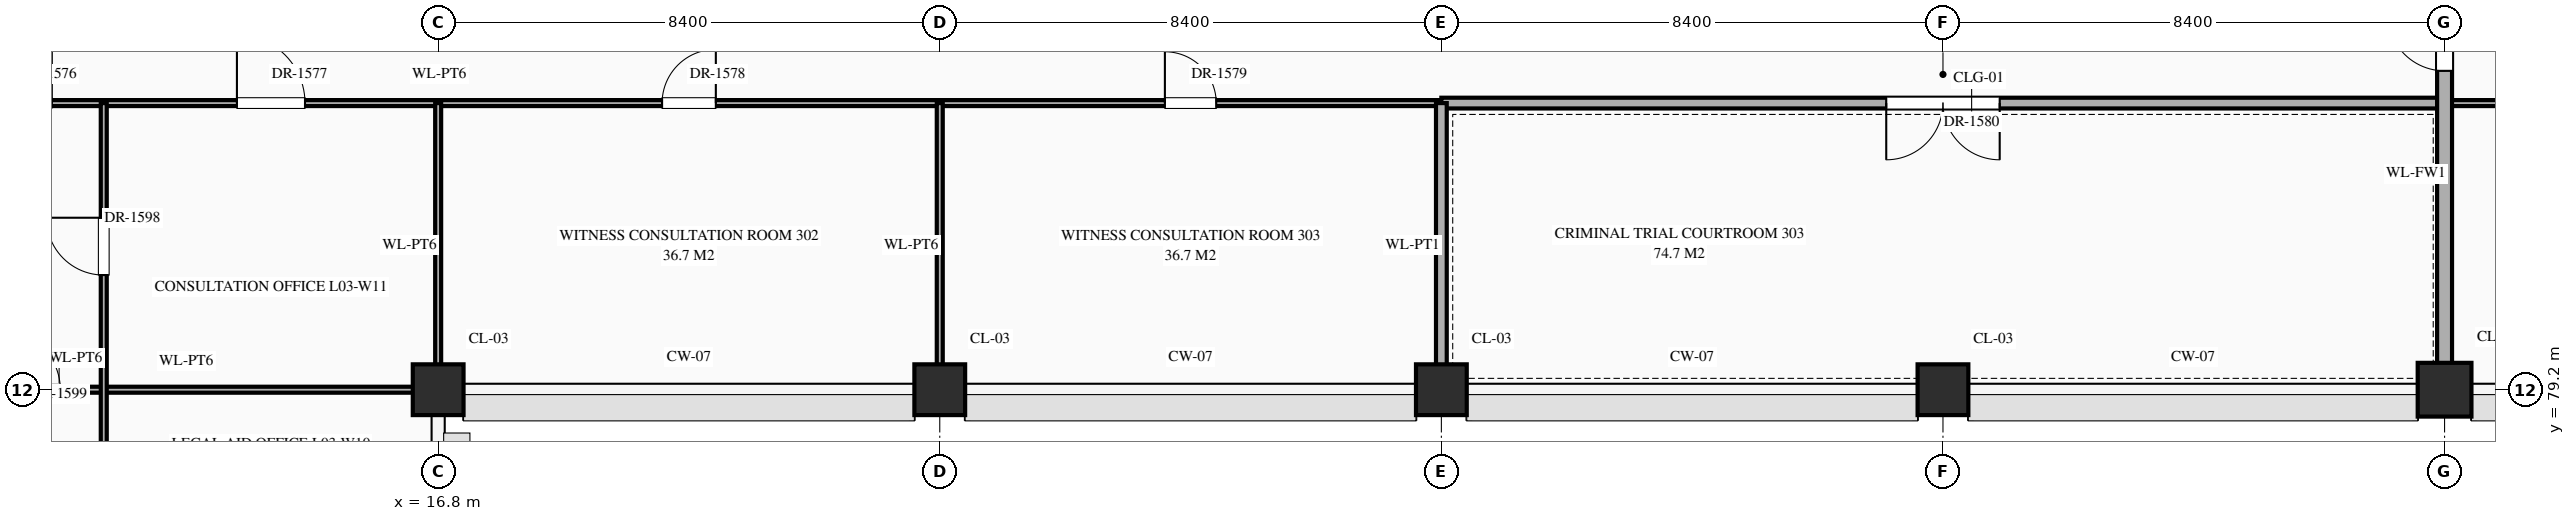
"""IFC4 building model, lengths in metres.
Left out: names, types, materials, properties, quantities, classifications, styles, units other than length and angle.
Written with IfcOpenShell. Run it as: python <this file> out.ifc"""

import sys

from ifc_helpers import new_model, si_unit, direction, frame, frame_2d, origin, origin_2d, place, context, subcontext, project, spatial, rectangle, extrude, element, fill, save


model = new_model("IFC4")
c1 = context("Model", 3, precision=1e-05, world=origin(), true_north=direction((0.0, 1.0)))
c2 = subcontext(c1, "Body", "Model", "MODEL_VIEW")
j1 = project(units=[si_unit("LENGTHUNIT", "METRE"), si_unit("PLANEANGLEUNIT", "RADIAN")], contexts=[c1])
p1 = place(None, origin())
s1 = spatial("IfcSite", under=j1, at=p1, CompositionType="ELEMENT")
p2 = place(p1, origin())
s2 = spatial("IfcBuilding", under=s1, at=p2, CompositionType="ELEMENT")
p3 = place(p2, frame((0.0, 0.0, 10.8)))
s3 = spatial("IfcBuildingStorey", under=s2, at=p3, CompositionType="ELEMENT", Elevation=10.8)
for number, where, z_axis, x_axis in (
    (1, (16.8, 79.2, 0.0), (0.0, 0.0, 1.0), (1.0, 0.0, 0.0)),
    (2, (25.2, 79.2, 0.0), (0.0, 0.0, 1.0), (1.0, 0.0, 0.0)),
    (3, (33.6, 79.2, 0.0), (0.0, 0.0, 1.0), (1.0, 0.0, 0.0)),
    (4, (42.0, 79.2, 0.0), (0.0, 0.0, 1.0), (1.0, 0.0, 0.0)),
):
    element("IfcColumn", number, at=place(p3, frame(where, z_axis=z_axis, x_axis=x_axis)), inside=s3, PredefinedType="COLUMN", context=c2, shape_type="SweptSolid", body=[
        extrude(rectangle(XDim=0.85, YDim=0.85, at=origin_2d()), origin(), (0.0, 0.0, 1.0), 5.4),
    ])
p4 = place(p3, frame((50.4, 79.2, 0.0), z_axis=(0.0, 0.0, 1.0), x_axis=(1.0, 0.0, 0.0)))
e5 = element("IfcColumn", 5, at=p4, inside=s3, PredefinedType="COLUMN", context=c2, shape_type="SweptSolid", body=[
    extrude(rectangle(XDim=0.9, YDim=0.9, at=origin_2d()), origin(), (0.0, 0.0, 1.0), 5.4),
])
p5 = place(p3, frame((8.4, 79.2, 0.0), z_axis=(0.0, 0.0, 1.0), x_axis=(1.0, 0.0, 0.0)))
e6 = element("IfcWall", 6, at=p5, inside=s3, PredefinedType="STANDARD", context=c2, shape_type="SweptSolid", body=[
    extrude(rectangle(XDim=8.36, YDim=0.1, at=frame_2d((4.18, 0.0))), origin(), (0.0, 0.0, 1.0), 4.27),
])
p6 = place(p5, frame((1.073, 0.0, 0.0)))
e7 = element("IfcOpeningElement", 7, at=p6, cuts=e6, PredefinedType="OPENING", context=c2, shape_type="SweptSolid", body=[
    extrude(rectangle(XDim=1.0, YDim=2.25, at=frame_2d((0.5, 1.125))), frame((0.0, 0.062, 0.0), z_axis=(0.0, -1.0, 0.0), x_axis=(1.0, 0.0, 0.0)), (0.0, 0.0, 1.0), 0.124),
])
p7 = place(p3, frame((0.04, 84.0, 0.0), z_axis=(0.0, 0.0, 1.0), x_axis=(1.0, 0.0, 0.0)))
e8 = element("IfcWall", 8, at=p7, inside=s3, PredefinedType="STANDARD", context=c2, shape_type="SweptSolid", body=[
    extrude(rectangle(XDim=33.56, YDim=0.1, at=frame_2d((16.78, 0.0))), origin(), (0.0, 0.0, 1.0), 5.12),
])
p8 = place(p7, frame((3.67, 0.0, 0.0)))
e9 = element("IfcOpeningElement", 9, at=p8, cuts=e8, PredefinedType="OPENING", context=c2, shape_type="SweptSolid", body=[
    extrude(rectangle(XDim=1.02, YDim=2.4, at=frame_2d((0.51, 1.2))), frame((0.0, 0.062, 0.0), z_axis=(0.0, -1.0, 0.0), x_axis=(1.0, 0.0, 0.0)), (0.0, 0.0, 1.0), 0.124),
])
p9 = place(p7, frame((9.23, 0.0, 0.0)))
e10 = element("IfcOpeningElement", 10, at=p9, cuts=e8, PredefinedType="OPENING", context=c2, shape_type="SweptSolid", body=[
    extrude(rectangle(XDim=1.06, YDim=2.4, at=frame_2d((0.53, 1.2))), frame((0.0, 0.062, 0.0), z_axis=(0.0, -1.0, 0.0), x_axis=(1.0, 0.0, 0.0)), (0.0, 0.0, 1.0), 0.124),
])
p10 = place(p7, frame((13.39, 0.0, 0.0)))
e11 = element("IfcOpeningElement", 11, at=p10, cuts=e8, PredefinedType="OPENING", context=c2, shape_type="SweptSolid", body=[
    extrude(rectangle(XDim=1.14, YDim=2.4, at=frame_2d((0.57, 1.2))), frame((0.0, 0.062, 0.0), z_axis=(0.0, -1.0, 0.0), x_axis=(1.0, 0.0, 0.0)), (0.0, 0.0, 1.0), 0.124),
])
p11 = place(p7, frame((20.51, 0.0, 0.0)))
e12 = element("IfcOpeningElement", 12, at=p11, cuts=e8, PredefinedType="OPENING", context=c2, shape_type="SweptSolid", body=[
    extrude(rectangle(XDim=0.9, YDim=2.15, at=frame_2d((0.45, 1.075))), frame((0.0, 0.062, 0.0), z_axis=(0.0, -1.0, 0.0), x_axis=(1.0, 0.0, 0.0)), (0.0, 0.0, 1.0), 0.124),
])
p12 = place(p7, frame((28.93, 0.0, 0.0)))
e13 = element("IfcOpeningElement", 13, at=p12, cuts=e8, PredefinedType="OPENING", context=c2, shape_type="SweptSolid", body=[
    extrude(rectangle(XDim=0.86, YDim=2.1, at=frame_2d((0.43, 1.05))), frame((0.0, 0.062, 0.0), z_axis=(0.0, -1.0, 0.0), x_axis=(1.0, 0.0, 0.0)), (0.0, 0.0, 1.0), 0.124),
])
p13 = place(p3, frame((33.6, 84.0, 0.0), z_axis=(0.0, 0.0, 1.0), x_axis=(1.0, 0.0, 0.0)))
e14 = element("IfcWall", 14, at=p13, inside=s3, PredefinedType="STANDARD", context=c2, shape_type="SweptSolid", body=[
    extrude(rectangle(XDim=16.8, YDim=0.18, at=frame_2d((8.4, 0.0))), origin(), (0.0, 0.0, 1.0), 5.12),
])
p14 = place(p13, frame((7.45, 0.0, 0.0)))
e15 = element("IfcOpeningElement", 15, at=p14, cuts=e14, PredefinedType="OPENING", context=c2, shape_type="SweptSolid", body=[
    extrude(rectangle(XDim=1.9, YDim=2.5, at=frame_2d((0.95, 1.25))), frame((0.0, 0.102, 0.0), z_axis=(0.0, -1.0, 0.0), x_axis=(1.0, 0.0, 0.0)), (0.0, 0.0, 1.0), 0.204),
])
p15 = place(p3, frame((50.4, 84.0, 0.0), z_axis=(0.0, 0.0, 1.0), x_axis=(1.0, 0.0, 0.0)))
e16 = element("IfcWall", 16, at=p15, inside=s3, PredefinedType="STANDARD", context=c2, shape_type="SweptSolid", body=[
    extrude(rectangle(XDim=67.2, YDim=0.1, at=frame_2d((33.6, 0.0))), origin(), (0.0, 0.0, 1.0), 5.12),
])
p16 = place(p15, frame((3.7, 0.0, 0.0)))
e17 = element("IfcOpeningElement", 17, at=p16, cuts=e16, PredefinedType="OPENING", context=c2, shape_type="SweptSolid", body=[
    extrude(rectangle(XDim=1.0, YDim=2.25, at=frame_2d((0.5, 1.125))), frame((0.0, 0.062, 0.0), z_axis=(0.0, -1.0, 0.0), x_axis=(1.0, 0.0, 0.0)), (0.0, 0.0, 1.0), 0.124),
])
p17 = place(p15, frame((12.08, 0.0, 0.0)))
e18 = element("IfcOpeningElement", 18, at=p17, cuts=e16, PredefinedType="OPENING", context=c2, shape_type="SweptSolid", body=[
    extrude(rectangle(XDim=1.04, YDim=2.2, at=frame_2d((0.52, 1.1))), frame((0.0, 0.062, 0.0), z_axis=(0.0, -1.0, 0.0), x_axis=(1.0, 0.0, 0.0)), (0.0, 0.0, 1.0), 0.124),
])
p18 = place(p15, frame((20.46, 0.0, 0.0)))
e19 = element("IfcOpeningElement", 19, at=p18, cuts=e16, PredefinedType="OPENING", context=c2, shape_type="SweptSolid", body=[
    extrude(rectangle(XDim=1.08, YDim=2.25, at=frame_2d((0.54, 1.125))), frame((0.0, 0.062, 0.0), z_axis=(0.0, -1.0, 0.0), x_axis=(1.0, 0.0, 0.0)), (0.0, 0.0, 1.0), 0.124),
])
p19 = place(p15, frame((28.84, 0.0, 0.0)))
e20 = element("IfcOpeningElement", 20, at=p19, cuts=e16, PredefinedType="OPENING", context=c2, shape_type="SweptSolid", body=[
    extrude(rectangle(XDim=1.12, YDim=2.25, at=frame_2d((0.56, 1.125))), frame((0.0, 0.062, 0.0), z_axis=(0.0, -1.0, 0.0), x_axis=(1.0, 0.0, 0.0)), (0.0, 0.0, 1.0), 0.124),
])
p20 = place(p15, frame((37.2, 0.0, 0.0)))
e21 = element("IfcOpeningElement", 21, at=p20, cuts=e16, PredefinedType="OPENING", context=c2, shape_type="SweptSolid", body=[
    extrude(rectangle(XDim=1.2, YDim=2.35, at=frame_2d((0.6, 1.175))), frame((0.0, 0.062, 0.0), z_axis=(0.0, -1.0, 0.0), x_axis=(1.0, 0.0, 0.0)), (0.0, 0.0, 1.0), 0.124),
])
p21 = place(p15, frame((45.58, 0.0, 0.0)))
e22 = element("IfcOpeningElement", 22, at=p21, cuts=e16, PredefinedType="OPENING", context=c2, shape_type="SweptSolid", body=[
    extrude(rectangle(XDim=1.24, YDim=2.3, at=frame_2d((0.62, 1.15))), frame((0.0, 0.062, 0.0), z_axis=(0.0, -1.0, 0.0), x_axis=(1.0, 0.0, 0.0)), (0.0, 0.0, 1.0), 0.124),
])
p22 = place(p15, frame((53.96, 0.0, 0.0)))
e23 = element("IfcOpeningElement", 23, at=p22, cuts=e16, PredefinedType="OPENING", context=c2, shape_type="SweptSolid", body=[
    extrude(rectangle(XDim=1.28, YDim=2.35, at=frame_2d((0.64, 1.175))), frame((0.0, 0.062, 0.0), z_axis=(0.0, -1.0, 0.0), x_axis=(1.0, 0.0, 0.0)), (0.0, 0.0, 1.0), 0.124),
])
p23 = place(p15, frame((62.53, 0.0, 0.0)))
e24 = element("IfcOpeningElement", 24, at=p23, cuts=e16, PredefinedType="OPENING", context=c2, shape_type="SweptSolid", body=[
    extrude(rectangle(XDim=0.94, YDim=2.3, at=frame_2d((0.47, 1.15))), frame((0.0, 0.062, 0.0), z_axis=(0.0, -1.0, 0.0), x_axis=(1.0, 0.0, 0.0)), (0.0, 0.0, 1.0), 0.124),
])
p24 = place(p3, frame((11.2, 64.8, 0.0), z_axis=(0.0, 0.0, 1.0), x_axis=(0.0, 1.0, 0.0)))
e25 = element("IfcWall", 25, at=p24, inside=s3, PredefinedType="STANDARD", context=c2, shape_type="SweptSolid", body=[
    extrude(rectangle(XDim=19.2, YDim=0.1, at=frame_2d((9.6, 0.0))), origin(), (0.0, 0.0, 1.0), 5.12),
])
p25 = place(p24, frame((16.32, 0.0, 0.0)))
e26 = element("IfcOpeningElement", 26, at=p25, cuts=e25, PredefinedType="OPENING", context=c2, shape_type="SweptSolid", body=[
    extrude(rectangle(XDim=0.96, YDim=2.2, at=frame_2d((0.48, 1.1))), frame((0.0, 0.062, 0.0), z_axis=(0.0, -1.0, 0.0), x_axis=(1.0, 0.0, 0.0)), (0.0, 0.0, 1.0), 0.124),
])
p26 = place(p24, frame((0.73, 0.0, 0.0)))
e27 = element("IfcOpeningElement", 27, at=p26, cuts=e25, PredefinedType="OPENING", context=c2, shape_type="SweptSolid", body=[
    extrude(rectangle(XDim=0.94, YDim=2.3, at=frame_2d((0.47, 1.15))), frame((0.0, 0.062, 0.0), z_axis=(0.0, -1.0, 0.0), x_axis=(1.0, 0.0, 0.0)), (0.0, 0.0, 1.0), 0.124),
])
p27 = place(p24, frame((4.31, 0.0, 0.0)))
e28 = element("IfcOpeningElement", 28, at=p27, cuts=e25, PredefinedType="OPENING", context=c2, shape_type="SweptSolid", body=[
    extrude(rectangle(XDim=0.98, YDim=2.35, at=frame_2d((0.49, 1.175))), frame((0.0, 0.062, 0.0), z_axis=(0.0, -1.0, 0.0), x_axis=(1.0, 0.0, 0.0)), (0.0, 0.0, 1.0), 0.124),
])
p28 = place(p24, frame((10.29, 0.0, 0.0)))
e29 = element("IfcOpeningElement", 29, at=p28, cuts=e25, PredefinedType="OPENING", context=c2, shape_type="SweptSolid", body=[
    extrude(rectangle(XDim=1.02, YDim=2.4, at=frame_2d((0.51, 1.2))), frame((0.0, 0.062, 0.0), z_axis=(0.0, -1.0, 0.0), x_axis=(1.0, 0.0, 0.0)), (0.0, 0.0, 1.0), 0.124),
])
for number, where, z_axis, x_axis in (
    (30, (16.8, 79.24, 0.0), (0.0, 0.0, 1.0), (0.0, 1.0, 0.0)),
    (31, (25.2, 79.24, 0.0), (0.0, 0.0, 1.0), (0.0, 1.0, 0.0)),
):
    element("IfcWall", number, at=place(p3, frame(where, z_axis=z_axis, x_axis=x_axis)), inside=s3, PredefinedType="STANDARD", context=c2, shape_type="SweptSolid", body=[
        extrude(rectangle(XDim=4.76, YDim=0.1, at=frame_2d((2.38, 0.0))), origin(), (0.0, 0.0, 1.0), 4.37),
    ])
p29 = place(p3, frame((33.6, 79.24, 0.0), z_axis=(0.0, 0.0, 1.0), x_axis=(0.0, 1.0, 0.0)))
e32 = element("IfcWall", 32, at=p29, inside=s3, PredefinedType="STANDARD", context=c2, shape_type="SweptSolid", body=[
    extrude(rectangle(XDim=4.76, YDim=0.18, at=frame_2d((2.38, 0.0))), origin(), (0.0, 0.0, 1.0), 4.37),
])
p30 = place(p3, frame((50.4, 79.24, 0.0), z_axis=(0.0, 0.0, 1.0), x_axis=(0.0, 1.0, 0.0)))
e33 = element("IfcWall", 33, at=p30, inside=s3, PredefinedType="STANDARD", context=c2, shape_type="SweptSolid", body=[
    extrude(rectangle(XDim=7.16, YDim=0.25, at=frame_2d((3.58, 0.0))), origin(), (0.0, 0.0, 1.0), 4.37),
])
p31 = place(p30, frame((5.3, 0.0, 0.0)))
e34 = element("IfcOpeningElement", 34, at=p31, cuts=e33, PredefinedType="OPENING", context=c2, shape_type="SweptSolid", body=[
    extrude(rectangle(XDim=0.95, YDim=2.15, at=frame_2d((0.475, 1.075))), frame((0.0, 0.137, 0.0), z_axis=(0.0, -1.0, 0.0), x_axis=(1.0, 0.0, 0.0)), (0.0, 0.0, 1.0), 0.274),
])
p32 = place(p31, origin())
e35 = element("IfcDoor", 35, at=p32, inside=s3, OperationType="SINGLE_SWING_RIGHT", PredefinedType="DOOR", context=c2, shape_type="SweptSolid", body=[
    extrude(rectangle(XDim=0.95, YDim=2.15, at=frame_2d((0.475, 1.075))), frame((0.0, 0.025, 0.0), z_axis=(0.0, -1.0, 0.0), x_axis=(1.0, 0.0, 0.0)), (0.0, 0.0, 1.0), 0.05),
])
fill(e34, e35)
p33 = place(p10, origin())
e36 = element("IfcDoor", 36, at=p33, inside=s3, OperationType="SINGLE_SWING_LEFT", PredefinedType="DOOR", context=c2, shape_type="SweptSolid", body=[
    extrude(rectangle(XDim=1.14, YDim=2.4, at=frame_2d((0.57, 1.2))), frame((0.0, 0.025, 0.0), z_axis=(0.0, -1.0, 0.0), x_axis=(1.0, 0.0, 0.0)), (0.0, 0.0, 1.0), 0.05),
])
fill(e11, e36)
p34 = place(p11, origin())
e37 = element("IfcDoor", 37, at=p34, inside=s3, OperationType="SINGLE_SWING_RIGHT", PredefinedType="DOOR", context=c2, shape_type="SweptSolid", body=[
    extrude(rectangle(XDim=0.9, YDim=2.15, at=frame_2d((0.45, 1.075))), frame((0.0, 0.025, 0.0), z_axis=(0.0, -1.0, 0.0), x_axis=(1.0, 0.0, 0.0)), (0.0, 0.0, 1.0), 0.05),
])
fill(e12, e37)
p35 = place(p12, origin())
e38 = element("IfcDoor", 38, at=p35, inside=s3, OperationType="SINGLE_SWING_LEFT", PredefinedType="DOOR", context=c2, shape_type="SweptSolid", body=[
    extrude(rectangle(XDim=0.86, YDim=2.1, at=frame_2d((0.43, 1.05))), frame((0.0, 0.025, 0.0), z_axis=(0.0, -1.0, 0.0), x_axis=(1.0, 0.0, 0.0)), (0.0, 0.0, 1.0), 0.05),
])
fill(e13, e38)
p36 = place(p14, frame((1.9, 0.0, 0.0), z_axis=(0.0, 0.0, 1.0), x_axis=(-1.0, 0.0, 0.0)))
e39 = element("IfcDoor", 39, at=p36, inside=s3, OperationType="DOUBLE_DOOR_SINGLE_SWING", PredefinedType="DOOR", context=c2, shape_type="SweptSolid", body=[
    extrude(rectangle(XDim=1.9, YDim=2.5, at=frame_2d((0.95, 1.25))), frame((0.0, 0.025, 0.0), z_axis=(0.0, -1.0, 0.0), x_axis=(1.0, 0.0, 0.0)), (0.0, 0.0, 1.0), 0.05),
])
fill(e15, e39)
p37 = place(p25, origin())
e40 = element("IfcDoor", 40, at=p37, inside=s3, OperationType="SINGLE_SWING_RIGHT", PredefinedType="DOOR", context=c2, shape_type="SweptSolid", body=[
    extrude(rectangle(XDim=0.96, YDim=2.2, at=frame_2d((0.48, 1.1))), frame((0.0, 0.025, 0.0), z_axis=(0.0, -1.0, 0.0), x_axis=(1.0, 0.0, 0.0)), (0.0, 0.0, 1.0), 0.05),
])
fill(e26, e40)
p38 = place(p6, origin())
e41 = element("IfcDoor", 41, at=p38, inside=s3, OperationType="SINGLE_SWING_LEFT", PredefinedType="DOOR", context=c2, shape_type="SweptSolid", body=[
    extrude(rectangle(XDim=1.0, YDim=2.25, at=frame_2d((0.5, 1.125))), frame((0.0, 0.025, 0.0), z_axis=(0.0, -1.0, 0.0), x_axis=(1.0, 0.0, 0.0)), (0.0, 0.0, 1.0), 0.05),
])
fill(e7, e41)
save(model, sys.argv[1])
